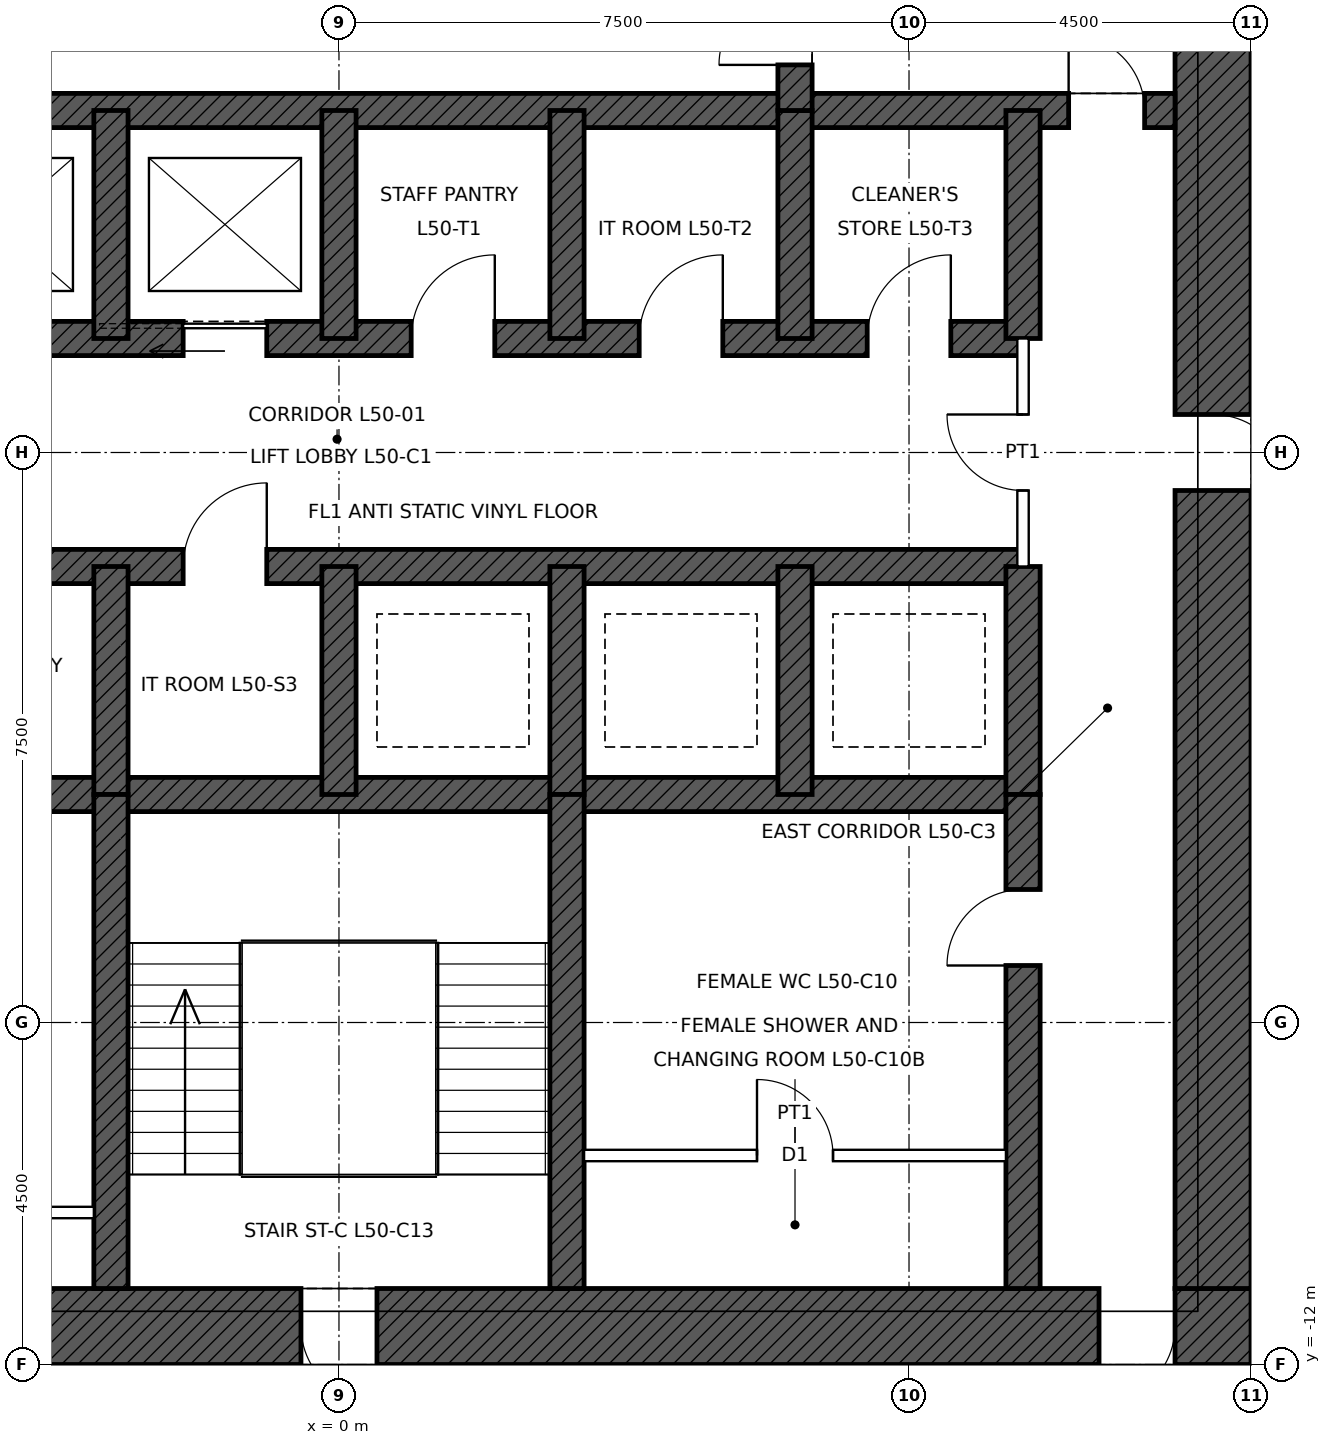
"""IFC4 building model, lengths in metres.
Left out: names, types, materials, properties, quantities, classifications, styles, units other than length and angle.
Written with IfcOpenShell. Run it as: python <this file> out.ifc"""

import sys

from ifc_helpers import new_model, si_unit, direction, frame, frame_2d, origin, place, context, subcontext, project, spatial, rectangle, extrude, element, fill, save


model = new_model("IFC4")
c1 = context("Model", 3, precision=1e-05, world=origin(), true_north=direction((0.0, 1.0)))
c2 = subcontext(c1, "Body", "Model", "MODEL_VIEW")
j1 = project(units=[si_unit("LENGTHUNIT", "METRE"), si_unit("PLANEANGLEUNIT", "RADIAN")], contexts=[c1])
p1 = place(None, origin())
s1 = spatial("IfcSite", under=j1, at=p1, CompositionType="ELEMENT")
p2 = place(p1, origin())
s2 = spatial("IfcBuilding", under=s1, at=p2, CompositionType="ELEMENT")
p3 = place(p2, frame((0.0, 0.0, 233.9)))
s3 = spatial("IfcBuildingStorey", under=s2, at=p3, CompositionType="ELEMENT", Elevation=233.9)
p4 = place(p3, frame((12.0, -11.5, 0.0), z_axis=(0.0, 0.0, 1.0), x_axis=(-1.0, 0.0, 0.0)))
e1 = element("IfcWall", 1, at=p4, inside=s3, PredefinedType="SHEAR", context=c2, shape_type="SweptSolid", body=[
    extrude(rectangle(XDim=24.0, YDim=1.0, at=frame_2d((12.0, 0.0))), origin(), (0.0, 0.0, 1.0), 4.0),
])
p5 = place(p4, frame((11.5, 0.0, 0.0)))
e2 = element("IfcOpeningElement", 2, at=p5, cuts=e1, PredefinedType="OPENING", context=c2, shape_type="SweptSolid", body=[
    extrude(rectangle(XDim=1.0, YDim=2.1, at=frame_2d((0.5, 1.05))), frame((0.0, 0.51, 0.0), z_axis=(0.0, -1.0, 0.0), x_axis=(1.0, 0.0, 0.0)), (0.0, 0.0, 1.0), 1.02),
])
p6 = place(p4, frame((1.0, 0.0, 0.0)))
e3 = element("IfcOpeningElement", 3, at=p6, cuts=e1, PredefinedType="OPENING", context=c2, shape_type="SweptSolid", body=[
    extrude(rectangle(XDim=1.0, YDim=2.4, at=frame_2d((0.5, 1.2))), frame((0.0, 0.51, 0.0), z_axis=(0.0, -1.0, 0.0), x_axis=(1.0, 0.0, 0.0)), (0.0, 0.0, 1.0), 1.02),
])
p7 = place(p3, frame((11.5, 11.0, 0.0), z_axis=(0.0, 0.0, 1.0), x_axis=(0.0, -1.0, 0.0)))
e4 = element("IfcWall", 4, at=p7, inside=s3, PredefinedType="SHEAR", context=c2, shape_type="SweptSolid", body=[
    extrude(rectangle(XDim=22.0, YDim=1.0, at=frame_2d((11.0, 0.0))), origin(), (0.0, 0.0, 1.0), 4.0),
])
p8 = place(p7, frame((10.5, 0.0, 0.0)))
e5 = element("IfcOpeningElement", 5, at=p8, cuts=e4, PredefinedType="OPENING", context=c2, shape_type="SweptSolid", body=[
    extrude(rectangle(XDim=1.0, YDim=2.4, at=frame_2d((0.5, 1.2))), frame((0.0, 0.51, 0.0), z_axis=(0.0, -1.0, 0.0), x_axis=(1.0, 0.0, 0.0)), (0.0, 0.0, 1.0), 1.02),
])
p9 = place(p3, frame((-11.0, 4.5, 0.0), z_axis=(0.0, 0.0, 1.0), x_axis=(1.0, 0.0, 0.0)))
e6 = element("IfcWall", 6, at=p9, inside=s3, PredefinedType="SHEAR", context=c2, shape_type="SweptSolid", body=[
    extrude(rectangle(XDim=22.0, YDim=0.45, at=frame_2d((11.0, 0.0))), origin(), (0.0, 0.0, 1.0), 4.0),
])
p10 = place(p9, frame((0.4, 0.0, 0.0)))
e7 = element("IfcOpeningElement", 7, at=p10, cuts=e6, PredefinedType="OPENING", context=c2, shape_type="SweptSolid", body=[
    extrude(rectangle(XDim=1.0, YDim=2.1, at=frame_2d((0.5, 1.05))), frame((0.0, 0.235, 0.0), z_axis=(0.0, -1.0, 0.0), x_axis=(1.0, 0.0, 0.0)), (0.0, 0.0, 1.0), 0.47),
])
p11 = place(p9, frame((20.6, 0.0, 0.0)))
e8 = element("IfcOpeningElement", 8, at=p11, cuts=e6, PredefinedType="OPENING", context=c2, shape_type="SweptSolid", body=[
    extrude(rectangle(XDim=1.0, YDim=2.1, at=frame_2d((0.5, 1.05))), frame((0.0, 0.235, 0.0), z_axis=(0.0, -1.0, 0.0), x_axis=(1.0, 0.0, 0.0)), (0.0, 0.0, 1.0), 0.47),
])
p12 = place(p3, frame((-9.0, 1.5, 0.0), z_axis=(0.0, 0.0, 1.0), x_axis=(1.0, 0.0, 0.0)))
e9 = element("IfcWall", 9, at=p12, inside=s3, PredefinedType="SHEAR", context=c2, shape_type="SweptSolid", body=[
    extrude(rectangle(XDim=18.0, YDim=0.45, at=frame_2d((9.0, 0.0))), origin(), (0.0, 0.0, 1.0), 4.0),
])
p13 = place(p12, frame((0.95, 0.0, 0.0)))
e10 = element("IfcOpeningElement", 10, at=p13, cuts=e9, PredefinedType="OPENING", context=c2, shape_type="SweptSolid", body=[
    extrude(rectangle(XDim=1.1, YDim=2.1, at=frame_2d((0.55, 1.05))), frame((0.0, 0.235, 0.0), z_axis=(0.0, -1.0, 0.0), x_axis=(1.0, 0.0, 0.0)), (0.0, 0.0, 1.0), 0.47),
])
p14 = place(p12, frame((3.95, 0.0, 0.0)))
e11 = element("IfcOpeningElement", 11, at=p14, cuts=e9, PredefinedType="OPENING", context=c2, shape_type="SweptSolid", body=[
    extrude(rectangle(XDim=1.1, YDim=2.1, at=frame_2d((0.55, 1.05))), frame((0.0, 0.235, 0.0), z_axis=(0.0, -1.0, 0.0), x_axis=(1.0, 0.0, 0.0)), (0.0, 0.0, 1.0), 0.47),
])
p15 = place(p12, frame((6.95, 0.0, 0.0)))
e12 = element("IfcOpeningElement", 12, at=p15, cuts=e9, PredefinedType="OPENING", context=c2, shape_type="SweptSolid", body=[
    extrude(rectangle(XDim=1.1, YDim=2.1, at=frame_2d((0.55, 1.05))), frame((0.0, 0.235, 0.0), z_axis=(0.0, -1.0, 0.0), x_axis=(1.0, 0.0, 0.0)), (0.0, 0.0, 1.0), 0.47),
])
p16 = place(p12, frame((9.95, 0.0, 0.0)))
e13 = element("IfcOpeningElement", 13, at=p16, cuts=e9, PredefinedType="OPENING", context=c2, shape_type="SweptSolid", body=[
    extrude(rectangle(XDim=1.1, YDim=2.1, at=frame_2d((0.55, 1.05))), frame((0.0, 0.235, 0.0), z_axis=(0.0, -1.0, 0.0), x_axis=(1.0, 0.0, 0.0)), (0.0, 0.0, 1.0), 0.47),
])
p17 = place(p12, frame((12.95, 0.0, 0.0)))
e14 = element("IfcOpeningElement", 14, at=p17, cuts=e9, PredefinedType="OPENING", context=c2, shape_type="SweptSolid", body=[
    extrude(rectangle(XDim=1.1, YDim=2.1, at=frame_2d((0.55, 1.05))), frame((0.0, 0.235, 0.0), z_axis=(0.0, -1.0, 0.0), x_axis=(1.0, 0.0, 0.0)), (0.0, 0.0, 1.0), 0.47),
])
p18 = place(p12, frame((15.95, 0.0, 0.0)))
e15 = element("IfcOpeningElement", 15, at=p18, cuts=e9, PredefinedType="OPENING", context=c2, shape_type="SweptSolid", body=[
    extrude(rectangle(XDim=1.1, YDim=2.1, at=frame_2d((0.55, 1.05))), frame((0.0, 0.235, 0.0), z_axis=(0.0, -1.0, 0.0), x_axis=(1.0, 0.0, 0.0)), (0.0, 0.0, 1.0), 0.47),
])
p19 = place(p3, frame((-9.0, -1.5, 0.0), z_axis=(0.0, 0.0, 1.0), x_axis=(1.0, 0.0, 0.0)))
e16 = element("IfcWall", 16, at=p19, inside=s3, PredefinedType="SHEAR", context=c2, shape_type="SweptSolid", body=[
    extrude(rectangle(XDim=18.0, YDim=0.45, at=frame_2d((9.0, 0.0))), origin(), (0.0, 0.0, 1.0), 4.0),
])
p20 = place(p19, frame((0.95, 0.0, 0.0)))
e17 = element("IfcOpeningElement", 17, at=p20, cuts=e16, PredefinedType="OPENING", context=c2, shape_type="SweptSolid", body=[
    extrude(rectangle(XDim=1.1, YDim=2.1, at=frame_2d((0.55, 1.05))), frame((0.0, 0.235, 0.0), z_axis=(0.0, -1.0, 0.0), x_axis=(1.0, 0.0, 0.0)), (0.0, 0.0, 1.0), 0.47),
])
p21 = place(p19, frame((3.95, 0.0, 0.0)))
e18 = element("IfcOpeningElement", 18, at=p21, cuts=e16, PredefinedType="OPENING", context=c2, shape_type="SweptSolid", body=[
    extrude(rectangle(XDim=1.1, YDim=2.1, at=frame_2d((0.55, 1.05))), frame((0.0, 0.235, 0.0), z_axis=(0.0, -1.0, 0.0), x_axis=(1.0, 0.0, 0.0)), (0.0, 0.0, 1.0), 0.47),
])
p22 = place(p19, frame((6.95, 0.0, 0.0)))
e19 = element("IfcOpeningElement", 19, at=p22, cuts=e16, PredefinedType="OPENING", context=c2, shape_type="SweptSolid", body=[
    extrude(rectangle(XDim=1.1, YDim=2.1, at=frame_2d((0.55, 1.05))), frame((0.0, 0.235, 0.0), z_axis=(0.0, -1.0, 0.0), x_axis=(1.0, 0.0, 0.0)), (0.0, 0.0, 1.0), 0.47),
])
p23 = place(p3, frame((-9.0, -4.5, 0.0), z_axis=(0.0, 0.0, 1.0), x_axis=(1.0, 0.0, 0.0)))
e20 = element("IfcWall", 20, at=p23, inside=s3, PredefinedType="SHEAR", context=c2, shape_type="SweptSolid", body=[
    extrude(rectangle(XDim=18.0, YDim=0.45, at=frame_2d((9.0, 0.0))), origin(), (0.0, 0.0, 1.0), 4.0),
])
for number, where, z_axis, x_axis in (
    (21, (9.0, 1.5, 0.0), (0.0, 0.0, 1.0), (0.0, 1.0, 0.0)),
    (22, (9.0, -4.5, 0.0), (0.0, 0.0, 1.0), (0.0, 1.0, 0.0)),
    (23, (-3.0, 1.5, 0.0), (0.0, 0.0, 1.0), (0.0, 1.0, 0.0)),
    (24, (0.0, 1.5, 0.0), (0.0, 0.0, 1.0), (0.0, 1.0, 0.0)),
    (25, (3.0, 1.5, 0.0), (0.0, 0.0, 1.0), (0.0, 1.0, 0.0)),
    (26, (6.0, 1.5, 0.0), (0.0, 0.0, 1.0), (0.0, 1.0, 0.0)),
    (27, (-3.0, -4.5, 0.0), (0.0, 0.0, 1.0), (0.0, 1.0, 0.0)),
    (28, (0.0, -4.5, 0.0), (0.0, 0.0, 1.0), (0.0, 1.0, 0.0)),
    (29, (3.0, -4.5, 0.0), (0.0, 0.0, 1.0), (0.0, 1.0, 0.0)),
    (30, (6.0, -4.5, 0.0), (0.0, 0.0, 1.0), (0.0, 1.0, 0.0)),
):
    element("IfcWall", number, at=place(p3, frame(where, z_axis=z_axis, x_axis=x_axis)), inside=s3, PredefinedType="SHEAR", context=c2, shape_type="SweptSolid", body=[
        extrude(rectangle(XDim=3.0, YDim=0.45, at=frame_2d((1.5, 0.0))), origin(), (0.0, 0.0, 1.0), 4.0),
    ])
p24 = place(p3, frame((6.0, 4.5, 0.0), z_axis=(0.0, 0.0, 1.0), x_axis=(0.0, 1.0, 0.0)))
e31 = element("IfcWall", 31, at=p24, inside=s3, PredefinedType="SHEAR", context=c2, shape_type="SweptSolid", body=[
    extrude(rectangle(XDim=6.5, YDim=0.45, at=frame_2d((3.25, 0.0))), origin(), (0.0, 0.0, 1.0), 4.0),
])
p25 = place(p24, frame((0.6, 0.0, 0.0)))
e32 = element("IfcOpeningElement", 32, at=p25, cuts=e31, PredefinedType="OPENING", context=c2, shape_type="SweptSolid", body=[
    extrude(rectangle(XDim=1.0, YDim=2.1, at=frame_2d((0.5, 1.05))), frame((0.0, 0.235, 0.0), z_axis=(0.0, -1.0, 0.0), x_axis=(1.0, 0.0, 0.0)), (0.0, 0.0, 1.0), 0.47),
])
p26 = place(p3, frame((9.0, -11.0, 0.0), z_axis=(0.0, 0.0, 1.0), x_axis=(0.0, 1.0, 0.0)))
e33 = element("IfcWall", 33, at=p26, inside=s3, PredefinedType="SHEAR", context=c2, shape_type="SweptSolid", body=[
    extrude(rectangle(XDim=6.5, YDim=0.45, at=frame_2d((3.25, 0.0))), origin(), (0.0, 0.0, 1.0), 4.0),
])
p27 = place(p26, frame((4.25, 0.0, 0.0)))
e34 = element("IfcOpeningElement", 34, at=p27, cuts=e33, PredefinedType="OPENING", context=c2, shape_type="SweptSolid", body=[
    extrude(rectangle(XDim=1.0, YDim=2.1, at=frame_2d((0.5, 1.05))), frame((0.0, 0.235, 0.0), z_axis=(0.0, -1.0, 0.0), x_axis=(1.0, 0.0, 0.0)), (0.0, 0.0, 1.0), 0.47),
])
for number, where, z_axis, x_axis in (
    (35, (-3.0, -11.0, 0.0), (0.0, 0.0, 1.0), (0.0, 1.0, 0.0)),
    (36, (3.0, -11.0, 0.0), (0.0, 0.0, 1.0), (0.0, 1.0, 0.0)),
):
    element("IfcWall", number, at=place(p3, frame(where, z_axis=z_axis, x_axis=x_axis)), inside=s3, PredefinedType="SHEAR", context=c2, shape_type="SweptSolid", body=[
        extrude(rectangle(XDim=6.5, YDim=0.45, at=frame_2d((3.25, 0.0))), origin(), (0.0, 0.0, 1.0), 4.0),
    ])
p28 = place(p3, frame((-8.775, -10.0, 0.0), z_axis=(0.0, 0.0, 1.0), x_axis=(1.0, 0.0, 0.0)))
e37 = element("IfcWall", 37, at=p28, inside=s3, PredefinedType="PARTITIONING", context=c2, shape_type="SweptSolid", body=[
    extrude(rectangle(XDim=5.55, YDim=0.15, at=frame_2d((2.775, 0.0))), origin(), (0.0, 0.0, 1.0), 3.75),
])
p29 = place(p28, frame((2.275, 0.0, 0.0)))
e38 = element("IfcOpeningElement", 38, at=p29, cuts=e37, PredefinedType="OPENING", context=c2, shape_type="SweptSolid", body=[
    extrude(rectangle(XDim=1.0, YDim=2.1, at=frame_2d((0.5, 1.05))), frame((0.0, 0.085, 0.0), z_axis=(0.0, -1.0, 0.0), x_axis=(1.0, 0.0, 0.0)), (0.0, 0.0, 1.0), 0.17),
])
p30 = place(p3, frame((3.225, -9.25, 0.0), z_axis=(0.0, 0.0, 1.0), x_axis=(1.0, 0.0, 0.0)))
e39 = element("IfcWall", 39, at=p30, inside=s3, PredefinedType="PARTITIONING", context=c2, shape_type="SweptSolid", body=[
    extrude(rectangle(XDim=5.55, YDim=0.15, at=frame_2d((2.775, 0.0))), origin(), (0.0, 0.0, 1.0), 3.75),
])
p31 = place(p30, frame((2.275, 0.0, 0.0)))
e40 = element("IfcOpeningElement", 40, at=p31, cuts=e39, PredefinedType="OPENING", context=c2, shape_type="SweptSolid", body=[
    extrude(rectangle(XDim=1.0, YDim=2.1, at=frame_2d((0.5, 1.05))), frame((0.0, 0.085, 0.0), z_axis=(0.0, -1.0, 0.0), x_axis=(1.0, 0.0, 0.0)), (0.0, 0.0, 1.0), 0.17),
])
p32 = place(p3, frame((9.0, -1.5, 0.0), z_axis=(0.0, 0.0, 1.0), x_axis=(0.0, 1.0, 0.0)))
e41 = element("IfcWall", 41, at=p32, inside=s3, PredefinedType="PARTITIONING", context=c2, shape_type="SweptSolid", body=[
    extrude(rectangle(XDim=3.0, YDim=0.15, at=frame_2d((1.5, 0.0))), origin(), (0.0, 0.0, 1.0), 3.75),
])
p33 = place(p32, frame((1.0, 0.0, 0.0)))
e42 = element("IfcOpeningElement", 42, at=p33, cuts=e41, PredefinedType="OPENING", context=c2, shape_type="SweptSolid", body=[
    extrude(rectangle(XDim=1.0, YDim=2.4, at=frame_2d((0.5, 1.2))), frame((0.0, 0.085, 0.0), z_axis=(0.0, -1.0, 0.0), x_axis=(1.0, 0.0, 0.0)), (0.0, 0.0, 1.0), 0.17),
])
p34 = place(p11, origin())
e43 = element("IfcDoor", 43, at=p34, inside=s3, OperationType="SINGLE_SWING_LEFT", PredefinedType="DOOR", context=c2, shape_type="SweptSolid", body=[
    extrude(rectangle(XDim=1.0, YDim=2.1, at=frame_2d((0.5, 1.05))), frame((0.0, 0.025, 0.0), z_axis=(0.0, -1.0, 0.0), x_axis=(1.0, 0.0, 0.0)), (0.0, 0.0, 1.0), 0.05),
])
fill(e8, e43)
p35 = place(p25, origin())
e44 = element("IfcDoor", 44, at=p35, inside=s3, OperationType="SINGLE_SWING_LEFT", PredefinedType="DOOR", context=c2, shape_type="SweptSolid", body=[
    extrude(rectangle(XDim=1.0, YDim=2.1, at=frame_2d((0.5, 1.05))), frame((0.0, 0.025, 0.0), z_axis=(0.0, -1.0, 0.0), x_axis=(1.0, 0.0, 0.0)), (0.0, 0.0, 1.0), 0.05),
])
fill(e32, e44)
p36 = place(p5, origin())
e45 = element("IfcDoor", 45, at=p36, inside=s3, OperationType="SINGLE_SWING_LEFT", PredefinedType="DOOR", context=c2, shape_type="SweptSolid", body=[
    extrude(rectangle(XDim=1.0, YDim=2.1, at=frame_2d((0.5, 1.05))), frame((0.0, 0.485, 0.0), z_axis=(0.0, -1.0, 0.0), x_axis=(1.0, 0.0, 0.0)), (0.0, 0.0, 1.0), 0.05),
])
fill(e2, e45)
p37 = place(p8, origin())
e46 = element("IfcDoor", 46, at=p37, inside=s3, OperationType="SINGLE_SWING_RIGHT", PredefinedType="DOOR", context=c2, shape_type="SweptSolid", body=[
    extrude(rectangle(XDim=1.0, YDim=2.4, at=frame_2d((0.5, 1.2))), frame((0.0, 0.485, 0.0), z_axis=(0.0, -1.0, 0.0), x_axis=(1.0, 0.0, 0.0)), (0.0, 0.0, 1.0), 0.05),
])
fill(e5, e46)
p38 = place(p6, origin())
e47 = element("IfcDoor", 47, at=p38, inside=s3, OperationType="SINGLE_SWING_RIGHT", PredefinedType="DOOR", context=c2, shape_type="SweptSolid", body=[
    extrude(rectangle(XDim=1.0, YDim=2.4, at=frame_2d((0.5, 1.2))), frame((0.0, 0.485, 0.0), z_axis=(0.0, -1.0, 0.0), x_axis=(1.0, 0.0, 0.0)), (0.0, 0.0, 1.0), 0.05),
])
fill(e3, e47)
p39 = place(p27, origin())
e48 = element("IfcDoor", 48, at=p39, inside=s3, OperationType="SINGLE_SWING_LEFT", PredefinedType="DOOR", context=c2, shape_type="SweptSolid", body=[
    extrude(rectangle(XDim=1.0, YDim=2.1, at=frame_2d((0.5, 1.05))), frame((0.0, 0.025, 0.0), z_axis=(0.0, -1.0, 0.0), x_axis=(1.0, 0.0, 0.0)), (0.0, 0.0, 1.0), 0.05),
])
fill(e34, e48)
p40 = place(p15, origin())
e49 = element("IfcDoor", 49, at=p40, inside=s3, OperationType="SLIDING_TO_LEFT", PredefinedType="DOOR", context=c2, shape_type="SweptSolid", body=[
    extrude(rectangle(XDim=1.1, YDim=2.1, at=frame_2d((0.55, 1.05))), frame((0.0, 0.025, 0.0), z_axis=(0.0, -1.0, 0.0), x_axis=(1.0, 0.0, 0.0)), (0.0, 0.0, 1.0), 0.05),
])
fill(e12, e49)
p41 = place(p31, origin())
e50 = element("IfcDoor", 50, at=p41, inside=s3, OperationType="SINGLE_SWING_LEFT", PredefinedType="DOOR", context=c2, shape_type="SweptSolid", body=[
    extrude(rectangle(XDim=1.0, YDim=2.1, at=frame_2d((0.5, 1.05))), frame((0.0, 0.025, 0.0), z_axis=(0.0, -1.0, 0.0), x_axis=(1.0, 0.0, 0.0)), (0.0, 0.0, 1.0), 0.05),
])
fill(e40, e50)
p42 = place(p33, origin())
e51 = element("IfcDoor", 51, at=p42, inside=s3, OperationType="SINGLE_SWING_RIGHT", PredefinedType="DOOR", context=c2, shape_type="SweptSolid", body=[
    extrude(rectangle(XDim=1.0, YDim=2.4, at=frame_2d((0.5, 1.2))), frame((0.0, 0.025, 0.0), z_axis=(0.0, -1.0, 0.0), x_axis=(1.0, 0.0, 0.0)), (0.0, 0.0, 1.0), 0.05),
])
fill(e42, e51)
p43 = place(p16, origin())
e52 = element("IfcDoor", 52, at=p43, inside=s3, OperationType="SINGLE_SWING_RIGHT", PredefinedType="DOOR", context=c2, shape_type="SweptSolid", body=[
    extrude(rectangle(XDim=1.1, YDim=2.1, at=frame_2d((0.55, 1.05))), frame((0.0, 0.025, 0.0), z_axis=(0.0, -1.0, 0.0), x_axis=(1.0, 0.0, 0.0)), (0.0, 0.0, 1.0), 0.05),
])
fill(e13, e52)
p44 = place(p17, origin())
e53 = element("IfcDoor", 53, at=p44, inside=s3, OperationType="SINGLE_SWING_RIGHT", PredefinedType="DOOR", context=c2, shape_type="SweptSolid", body=[
    extrude(rectangle(XDim=1.1, YDim=2.1, at=frame_2d((0.55, 1.05))), frame((0.0, 0.025, 0.0), z_axis=(0.0, -1.0, 0.0), x_axis=(1.0, 0.0, 0.0)), (0.0, 0.0, 1.0), 0.05),
])
fill(e14, e53)
p45 = place(p18, origin())
e54 = element("IfcDoor", 54, at=p45, inside=s3, OperationType="SINGLE_SWING_RIGHT", PredefinedType="DOOR", context=c2, shape_type="SweptSolid", body=[
    extrude(rectangle(XDim=1.1, YDim=2.1, at=frame_2d((0.55, 1.05))), frame((0.0, 0.025, 0.0), z_axis=(0.0, -1.0, 0.0), x_axis=(1.0, 0.0, 0.0)), (0.0, 0.0, 1.0), 0.05),
])
fill(e15, e54)
p46 = place(p22, origin())
e55 = element("IfcDoor", 55, at=p46, inside=s3, OperationType="SINGLE_SWING_RIGHT", PredefinedType="DOOR", context=c2, shape_type="SweptSolid", body=[
    extrude(rectangle(XDim=1.1, YDim=2.1, at=frame_2d((0.55, 1.05))), frame((0.0, 0.025, 0.0), z_axis=(0.0, -1.0, 0.0), x_axis=(1.0, 0.0, 0.0)), (0.0, 0.0, 1.0), 0.05),
])
fill(e19, e55)
save(model, sys.argv[1])
